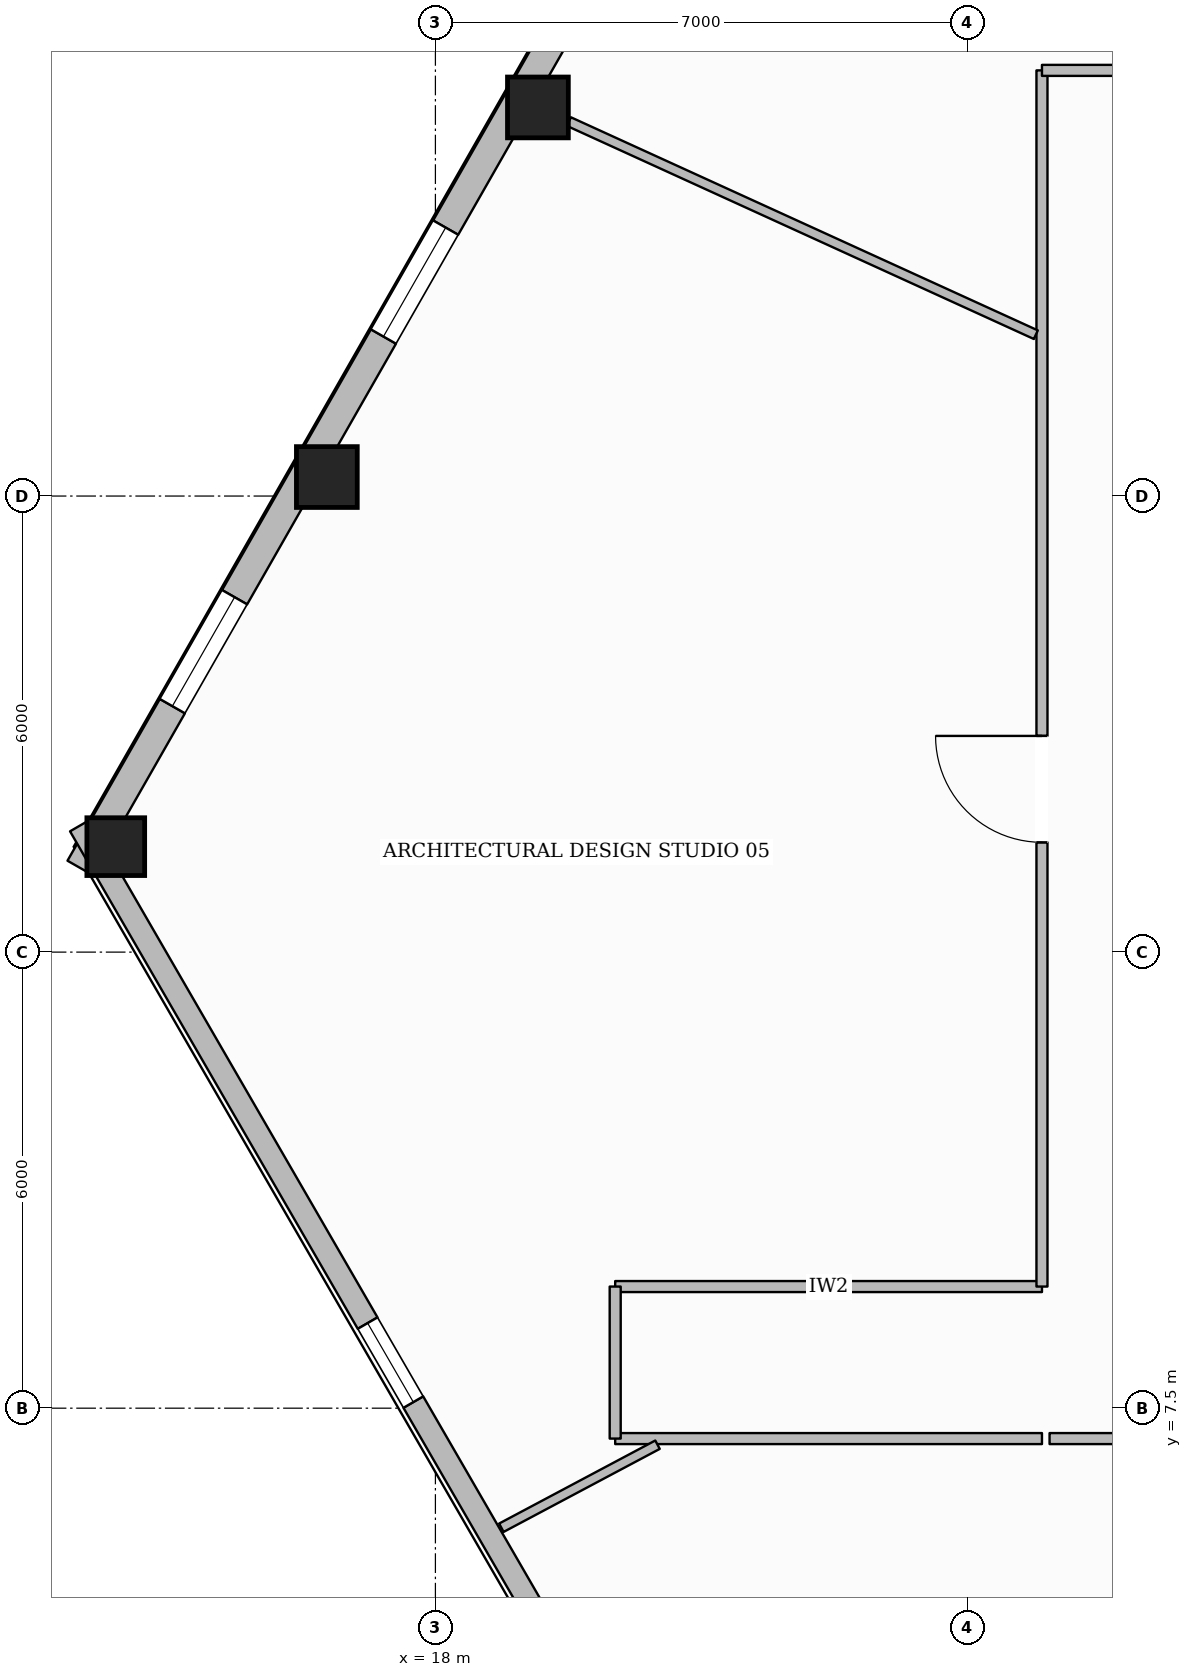
"""IFC4 building model, lengths in metres.
Left out: names, types, materials, properties, quantities, classifications, styles, units other than length and angle.
Written with IfcOpenShell. Run it as: python <this file> out.ifc"""

import sys

from ifc_helpers import new_model, si_unit, direction, frame, frame_2d, origin, origin_2d, place, context, subcontext, project, spatial, rectangle, hollow_rectangle, extrude, element, fill, save


model = new_model("IFC4")
c1 = context("Model", 3, precision=1e-05, world=origin(), true_north=direction((0.0, 1.0)))
c2 = subcontext(c1, "Body", "Model", "MODEL_VIEW")
j1 = project(units=[si_unit("LENGTHUNIT", "METRE"), si_unit("PLANEANGLEUNIT", "RADIAN")], contexts=[c1])
p1 = place(None, origin())
s1 = spatial("IfcSite", under=j1, at=p1, CompositionType="ELEMENT")
p2 = place(p1, origin())
s2 = spatial("IfcBuilding", under=s1, at=p2, CompositionType="ELEMENT")
p3 = place(p2, frame((0.0, 0.0, 40.65)))
s3 = spatial("IfcBuildingStorey", under=s2, at=p3, CompositionType="ELEMENT", Elevation=40.65)
for number, where, z_axis, x_axis in (
    (1, (19.349, 24.613, 0.0), (0.0, 0.0, 1.0), (1.0, 0.0, 0.0)),
    (2, (16.572, 19.75, 0.0), (0.0, 0.0, 1.0), (1.0, 0.0, 0.0)),
):
    element("IfcColumn", number, at=place(p3, frame(where, z_axis=z_axis, x_axis=x_axis)), inside=s3, PredefinedType="COLUMN", context=c2, shape_type="SweptSolid", body=[
        extrude(hollow_rectangle(XDim=0.8, YDim=0.8, WallThickness=0.036, at=origin_2d()), origin(), (0.0, 0.0, 1.0), 3.59),
    ])
p4 = place(p3, frame((13.795, 14.887, 0.0), z_axis=(0.0, 0.0, 1.0), x_axis=(1.0, 0.0, 0.0)))
e3 = element("IfcColumn", 3, at=p4, inside=s3, PredefinedType="COLUMN", context=c2, shape_type="SweptSolid", body=[
    extrude(hollow_rectangle(XDim=0.76, YDim=0.76, WallThickness=0.035, at=origin_2d()), origin(), (0.0, 0.0, 1.0), 3.59),
])
p5 = place(p3, frame((13.324, 14.608, 0.0), z_axis=(0.0, 0.0, 1.0), x_axis=(0.495909124573, 0.868374423947, 0.0)))
e4 = element("IfcWall", 4, at=p5, inside=s3, PredefinedType="STANDARD", context=c2, shape_type="SweptSolid", body=[
    extrude(rectangle(XDim=34.553, YDim=0.38, at=frame_2d((17.277, 0.0))), origin(), (0.0, 0.0, 1.0), 2.97),
])
p6 = place(p5, frame((30.448, 0.0, 0.65)))
e5 = element("IfcOpeningElement", 5, at=p6, cuts=e4, PredefinedType="OPENING", context=c2, shape_type="SweptSolid", body=[
    extrude(rectangle(XDim=1.65, YDim=1.75, at=frame_2d((0.825, 0.875))), frame((0.0, 0.2, 0.0), z_axis=(0.0, -1.0, 0.0), x_axis=(1.0, 0.0, 0.0)), (0.0, 0.0, 1.0), 0.4),
])
p7 = place(p5, frame((24.849, 0.0, 0.65)))
e6 = element("IfcOpeningElement", 6, at=p7, cuts=e4, PredefinedType="OPENING", context=c2, shape_type="SweptSolid", body=[
    extrude(rectangle(XDim=1.65, YDim=1.75, at=frame_2d((0.825, 0.875))), frame((0.0, 0.2, 0.0), z_axis=(0.0, -1.0, 0.0), x_axis=(1.0, 0.0, 0.0)), (0.0, 0.0, 1.0), 0.4),
])
p8 = place(p5, frame((19.249, 0.0, 0.65)))
e7 = element("IfcOpeningElement", 7, at=p8, cuts=e4, PredefinedType="OPENING", context=c2, shape_type="SweptSolid", body=[
    extrude(rectangle(XDim=1.65, YDim=1.75, at=frame_2d((0.825, 0.875))), frame((0.0, 0.2, 0.0), z_axis=(0.0, -1.0, 0.0), x_axis=(1.0, 0.0, 0.0)), (0.0, 0.0, 1.0), 0.4),
])
p9 = place(p5, frame((8.05, 0.0, 0.65)))
e8 = element("IfcOpeningElement", 8, at=p9, cuts=e4, PredefinedType="OPENING", context=c2, shape_type="SweptSolid", body=[
    extrude(rectangle(XDim=1.65, YDim=1.75, at=frame_2d((0.825, 0.875))), frame((0.0, 0.2, 0.0), z_axis=(0.0, -1.0, 0.0), x_axis=(1.0, 0.0, 0.0)), (0.0, 0.0, 1.0), 0.4),
])
p10 = place(p5, frame((2.451, 0.0, 0.65)))
e9 = element("IfcOpeningElement", 9, at=p10, cuts=e4, PredefinedType="OPENING", context=c2, shape_type="SweptSolid", body=[
    extrude(rectangle(XDim=1.65, YDim=1.75, at=frame_2d((0.825, 0.875))), frame((0.0, 0.2, 0.0), z_axis=(0.0, -1.0, 0.0), x_axis=(1.0, 0.0, 0.0)), (0.0, 0.0, 1.0), 0.4),
])
p11 = place(p3, frame((21.495, 1.035, 0.0), z_axis=(0.0, 0.0, 1.0), x_axis=(-0.500661817397, 0.865642966009, 0.0)))
e10 = element("IfcWall", 10, at=p11, inside=s3, PredefinedType="STANDARD", context=c2, shape_type="SweptSolid", body=[
    extrude(rectangle(XDim=16.322, YDim=0.3, at=frame_2d((8.161, 0.0))), origin(), (0.0, 0.0, 1.0), 2.97),
])
p12 = place(p11, frame((7.561, 0.0, 0.65)))
e11 = element("IfcOpeningElement", 11, at=p12, cuts=e10, PredefinedType="OPENING", context=c2, shape_type="SweptSolid", body=[
    extrude(rectangle(XDim=1.2, YDim=1.7, at=frame_2d((0.6, 0.85))), frame((0.0, 0.16, 0.0), z_axis=(0.0, -1.0, 0.0), x_axis=(1.0, 0.0, 0.0)), (0.0, 0.0, 1.0), 0.32),
])
p13 = place(p3, frame((20.365, 9.1, 0.0), z_axis=(0.0, 0.0, 1.0), x_axis=(1.0, 0.0, 0.0)))
e12 = element("IfcWall", 12, at=p13, inside=s3, PredefinedType="PARTITIONING", context=c2, shape_type="SweptSolid", body=[
    extrude(rectangle(XDim=5.615, YDim=0.145, at=frame_2d((2.807, 0.0))), origin(), (0.0, 0.0, 1.0), 3.59),
])
p14 = place(p3, frame((25.98, 9.1, 0.0), z_axis=(0.0, 0.0, 1.0), x_axis=(0.0, 1.0, 0.0)))
e13 = element("IfcWall", 13, at=p14, inside=s3, PredefinedType="PARTITIONING", context=c2, shape_type="SweptSolid", body=[
    extrude(rectangle(XDim=16.0, YDim=0.145, at=frame_2d((8.0, 0.0))), origin(), (0.0, 0.0, 1.0), 3.278),
])
p15 = place(p14, frame((5.844, 0.0, 0.0)))
e14 = element("IfcOpeningElement", 14, at=p15, cuts=e13, PredefinedType="OPENING", context=c2, shape_type="SweptSolid", body=[
    extrude(rectangle(XDim=1.4, YDim=2.2, at=frame_2d((0.7, 1.1))), frame((0.0, 0.083, 0.0), z_axis=(0.0, -1.0, 0.0), x_axis=(1.0, 0.0, 0.0)), (0.0, 0.0, 1.0), 0.165),
])
p16 = place(p3, frame((25.98, 25.1, 0.0), z_axis=(0.0, 0.0, 1.0), x_axis=(1.0, 0.0, 0.0)))
e15 = element("IfcWall", 15, at=p16, inside=s3, PredefinedType="PARTITIONING", context=c2, shape_type="SweptSolid", body=[
    extrude(rectangle(XDim=11.02, YDim=0.145, at=frame_2d((5.51, 0.0))), origin(), (0.0, 0.0, 1.0), 3.59),
])
p17 = place(p16, frame((3.167, 0.0, 0.0)))
e16 = element("IfcOpeningElement", 16, at=p17, cuts=e15, PredefinedType="OPENING", context=c2, shape_type="SweptSolid", body=[
    extrude(rectangle(XDim=1.4, YDim=2.2, at=frame_2d((0.7, 1.1))), frame((0.0, 0.083, 0.0), z_axis=(0.0, -1.0, 0.0), x_axis=(1.0, 0.0, 0.0)), (0.0, 0.0, 1.0), 0.165),
])
p18 = place(p3, frame((49.92, 7.1, 0.0), z_axis=(0.0, 0.0, 1.0), x_axis=(-1.0, 0.0, 0.0)))
e17 = element("IfcWall", 17, at=p18, inside=s3, PredefinedType="PARTITIONING", context=c2, shape_type="SweptSolid", body=[
    extrude(rectangle(XDim=23.84, YDim=0.145, at=frame_2d((11.92, 0.0))), origin(), (0.0, 0.0, 1.0), 3.278),
])
p19 = place(p18, frame((18.48, 0.0, 0.0)))
e18 = element("IfcOpeningElement", 18, at=p19, cuts=e17, PredefinedType="OPENING", context=c2, shape_type="SweptSolid", body=[
    extrude(rectangle(XDim=0.88, YDim=2.1, at=frame_2d((0.44, 1.05))), frame((0.0, 0.083, 0.0), z_axis=(0.0, -1.0, 0.0), x_axis=(1.0, 0.0, 0.0)), (0.0, 0.0, 1.0), 0.165),
])
p20 = place(p18, frame((15.96, 0.0, 0.0)))
e19 = element("IfcOpeningElement", 19, at=p20, cuts=e17, PredefinedType="OPENING", context=c2, shape_type="SweptSolid", body=[
    extrude(rectangle(XDim=0.88, YDim=2.1, at=frame_2d((0.44, 1.05))), frame((0.0, 0.083, 0.0), z_axis=(0.0, -1.0, 0.0), x_axis=(1.0, 0.0, 0.0)), (0.0, 0.0, 1.0), 0.165),
])
p21 = place(p18, frame((13.5, 0.0, 0.0)))
e20 = element("IfcOpeningElement", 20, at=p21, cuts=e17, PredefinedType="OPENING", context=c2, shape_type="SweptSolid", body=[
    extrude(rectangle(XDim=0.96, YDim=2.1, at=frame_2d((0.48, 1.05))), frame((0.0, 0.083, 0.0), z_axis=(0.0, -1.0, 0.0), x_axis=(1.0, 0.0, 0.0)), (0.0, 0.0, 1.0), 0.165),
])
p22 = place(p18, frame((5.801, 0.0, 0.0)))
e21 = element("IfcOpeningElement", 21, at=p22, cuts=e17, PredefinedType="OPENING", context=c2, shape_type="SweptSolid", body=[
    extrude(rectangle(XDim=1.4, YDim=2.2, at=frame_2d((0.7, 1.1))), frame((0.0, 0.083, 0.0), z_axis=(0.0, -1.0, 0.0), x_axis=(1.0, 0.0, 0.0)), (0.0, 0.0, 1.0), 0.165),
])
p23 = place(p3, frame((25.98, 7.1, 0.0), z_axis=(0.0, 0.0, 1.0), x_axis=(-1.0, 0.0, 0.0)))
e22 = element("IfcWall", 22, at=p23, inside=s3, PredefinedType="PARTITIONING", context=c2, shape_type="SweptSolid", body=[
    extrude(rectangle(XDim=5.615, YDim=0.145, at=frame_2d((2.807, 0.0))), origin(), (0.0, 0.0, 1.0), 3.59),
])
p24 = place(p3, frame((20.365, 7.1, 0.0), z_axis=(0.0, 0.0, 1.0), x_axis=(0.0, 1.0, 0.0)))
e23 = element("IfcWall", 23, at=p24, inside=s3, PredefinedType="PARTITIONING", context=c2, shape_type="SweptSolid", body=[
    extrude(rectangle(XDim=2.0, YDim=0.145, at=frame_2d((1.0, 0.0))), origin(), (0.0, 0.0, 1.0), 3.59),
])
p25 = place(p3, frame((25.899, 21.623, 0.0), z_axis=(0.0, 0.0, 1.0), x_axis=(-0.909736399744, 0.415186323209, 0.0)))
e24 = element("IfcWall", 24, at=p25, inside=s3, PredefinedType="PARTITIONING", context=c2, shape_type="SweptSolid", body=[
    extrude(rectangle(XDim=6.752, YDim=0.125, at=frame_2d((3.376, 0.0))), origin(), (0.0, 0.0, 1.0), 3.057),
])
p26 = place(p3, frame((20.922, 7.02, 0.0), z_axis=(0.0, 0.0, 1.0), x_axis=(-0.882918663143, -0.469525967625, 0.0)))
e25 = element("IfcWall", 25, at=p26, inside=s3, PredefinedType="PARTITIONING", context=c2, shape_type="SweptSolid", body=[
    extrude(rectangle(XDim=2.327, YDim=0.125, at=frame_2d((1.164, 0.0))), origin(), (0.0, 0.0, 1.0), 3.59),
])
p27 = place(p9, origin())
e26 = element("IfcWindow", 26, at=p27, inside=s3, PartitioningType="SINGLE_PANEL", PredefinedType="WINDOW", context=c2, shape_type="SweptSolid", body=[
    extrude(rectangle(XDim=1.65, YDim=1.75, at=frame_2d((0.825, 0.875))), frame((0.0, 0.03, 0.0), z_axis=(0.0, -1.0, 0.0), x_axis=(1.0, 0.0, 0.0)), (0.0, 0.0, 1.0), 0.06),
])
fill(e8, e26)
p28 = place(p10, origin())
e27 = element("IfcWindow", 27, at=p28, inside=s3, PartitioningType="SINGLE_PANEL", PredefinedType="WINDOW", context=c2, shape_type="SweptSolid", body=[
    extrude(rectangle(XDim=1.65, YDim=1.75, at=frame_2d((0.825, 0.875))), frame((0.0, 0.03, 0.0), z_axis=(0.0, -1.0, 0.0), x_axis=(1.0, 0.0, 0.0)), (0.0, 0.0, 1.0), 0.06),
])
fill(e9, e27)
p29 = place(p12, origin())
e28 = element("IfcWindow", 28, at=p29, inside=s3, PartitioningType="SINGLE_PANEL", PredefinedType="WINDOW", context=c2, shape_type="SweptSolid", body=[
    extrude(rectangle(XDim=1.2, YDim=1.7, at=frame_2d((0.6, 0.85))), frame((0.0, 0.03, 0.0), z_axis=(0.0, -1.0, 0.0), x_axis=(1.0, 0.0, 0.0)), (0.0, 0.0, 1.0), 0.06),
])
fill(e11, e28)
p30 = place(p15, origin())
e29 = element("IfcDoor", 29, at=p30, inside=s3, OperationType="SINGLE_SWING_RIGHT", PredefinedType="DOOR", context=c2, shape_type="SweptSolid", body=[
    extrude(rectangle(XDim=1.4, YDim=2.2, at=frame_2d((0.7, 1.1))), frame((0.0, 0.025, 0.0), z_axis=(0.0, -1.0, 0.0), x_axis=(1.0, 0.0, 0.0)), (0.0, 0.0, 1.0), 0.05),
])
fill(e14, e29)
save(model, sys.argv[1])
